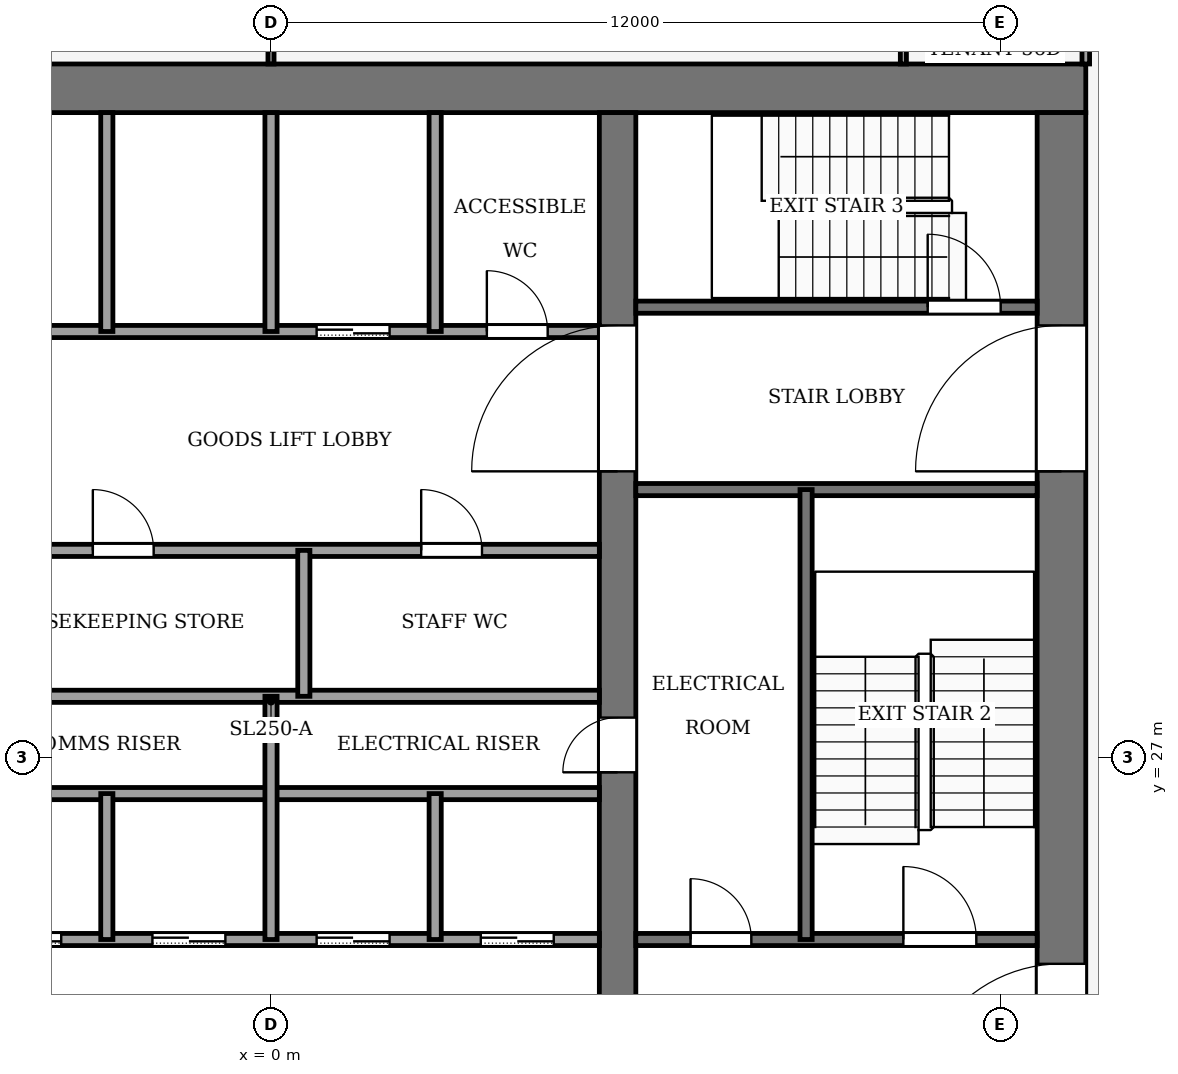
"""IFC4 building model, lengths in metres.
Left out: names, types, materials, properties, quantities, classifications, styles, units other than length and angle.
Written with IfcOpenShell. Run it as: python <this file> out.ifc"""

import sys

from ifc_helpers import new_model, si_unit, direction, frame, frame_2d, origin, place, context, subcontext, project, spatial, rectangle, extrude, element, fill, save


model = new_model("IFC4")
c1 = context("Model", 3, precision=1e-05, world=origin(), true_north=direction((0.0, 1.0)))
c2 = subcontext(c1, "Body", "Model", "MODEL_VIEW")
j1 = project(units=[si_unit("LENGTHUNIT", "METRE"), si_unit("PLANEANGLEUNIT", "RADIAN")], contexts=[c1])
p1 = place(None, origin())
s1 = spatial("IfcSite", under=j1, at=p1, CompositionType="ELEMENT")
p2 = place(p1, origin())
s2 = spatial("IfcBuilding", under=s1, at=p2, CompositionType="ELEMENT")
p3 = place(p2, frame((0.0, 0.0, 246.0)))
s3 = spatial("IfcBuildingStorey", under=s2, at=p3, CompositionType="ELEMENT", Elevation=246.0)
p4 = place(p3, frame((-13.4, 38.0, -0.13), z_axis=(0.0, 0.0, 1.0), x_axis=(1.0, 0.0, 0.0)))
e1 = element("IfcWall", 1, at=p4, inside=s3, PredefinedType="SHEAR", context=c2, shape_type="SweptSolid", body=[
    extrude(rectangle(XDim=26.8, YDim=0.8, at=frame_2d((13.4, 0.0))), origin(), (0.0, 0.0, 1.0), 4.0),
])
p5 = place(p3, frame((13.0, 18.4, -0.13), z_axis=(0.0, 0.0, 1.0), x_axis=(0.0, 1.0, 0.0)))
e2 = element("IfcWall", 2, at=p5, inside=s3, PredefinedType="SHEAR", context=c2, shape_type="SweptSolid", body=[
    extrude(rectangle(XDim=19.2, YDim=0.8, at=frame_2d((9.6, 0.0))), origin(), (0.0, 0.0, 1.0), 4.0),
])
p6 = place(p5, frame((2.8, 0.0, 0.13)))
e3 = element("IfcOpeningElement", 3, at=p6, cuts=e2, PredefinedType="OPENING", context=c2, shape_type="SweptSolid", body=[
    extrude(rectangle(XDim=2.4, YDim=2.4, at=frame_2d((1.2, 1.2))), frame((0.0, 0.41, 0.0), z_axis=(0.0, -1.0, 0.0), x_axis=(1.0, 0.0, 0.0)), (0.0, 0.0, 1.0), 0.82),
])
p7 = place(p5, frame((13.3, 0.0, 0.13)))
e4 = element("IfcOpeningElement", 4, at=p7, cuts=e2, PredefinedType="OPENING", context=c2, shape_type="SweptSolid", body=[
    extrude(rectangle(XDim=2.4, YDim=2.4, at=frame_2d((1.2, 1.2))), frame((0.0, 0.41, 0.0), z_axis=(0.0, -1.0, 0.0), x_axis=(1.0, 0.0, 0.0)), (0.0, 0.0, 1.0), 0.82),
])
p8 = place(p3, frame((5.7, 18.4, -0.13), z_axis=(0.0, 0.0, 1.0), x_axis=(0.0, 1.0, 0.0)))
e5 = element("IfcWall", 5, at=p8, inside=s3, PredefinedType="SHEAR", context=c2, shape_type="SweptSolid", body=[
    extrude(rectangle(XDim=19.2, YDim=0.6, at=frame_2d((9.6, 0.0))), origin(), (0.0, 0.0, 1.0), 4.0),
])
p9 = place(p8, frame((8.35, 0.0, 0.13)))
e6 = element("IfcOpeningElement", 6, at=p9, cuts=e5, PredefinedType="OPENING", context=c2, shape_type="SweptSolid", body=[
    extrude(rectangle(XDim=0.9, YDim=2.1, at=frame_2d((0.45, 1.05))), frame((0.0, 0.31, 0.0), z_axis=(0.0, -1.0, 0.0), x_axis=(1.0, 0.0, 0.0)), (0.0, 0.0, 1.0), 0.62),
])
p10 = place(p8, frame((13.3, 0.0, 0.13)))
e7 = element("IfcOpeningElement", 7, at=p10, cuts=e5, PredefinedType="OPENING", context=c2, shape_type="SweptSolid", body=[
    extrude(rectangle(XDim=2.4, YDim=2.4, at=frame_2d((1.2, 1.2))), frame((0.0, 0.31, 0.0), z_axis=(0.0, -1.0, 0.0), x_axis=(1.0, 0.0, 0.0)), (0.0, 0.0, 1.0), 0.62),
])
p11 = place(p3, frame((-5.4, 24.0, 0.0), z_axis=(0.0, 0.0, 1.0), x_axis=(1.0, 0.0, 0.0)))
e8 = element("IfcWall", 8, at=p11, inside=s3, PredefinedType="PARTITIONING", context=c2, shape_type="SweptSolid", body=[
    extrude(rectangle(XDim=10.8, YDim=0.2, at=frame_2d((5.4, 0.0))), origin(), (0.0, 0.0, 1.0), 3.87),
])
p12 = place(p11, frame((0.75, 0.0, 0.0)))
e9 = element("IfcOpeningElement", 9, at=p12, cuts=e8, PredefinedType="OPENING", context=c2, shape_type="SweptSolid", body=[
    extrude(rectangle(XDim=1.2, YDim=2.2, at=frame_2d((0.6, 1.1))), frame((0.0, 0.11, 0.0), z_axis=(0.0, -1.0, 0.0), x_axis=(1.0, 0.0, 0.0)), (0.0, 0.0, 1.0), 0.22),
])
p13 = place(p11, frame((3.45, 0.0, 0.0)))
e10 = element("IfcOpeningElement", 10, at=p13, cuts=e8, PredefinedType="OPENING", context=c2, shape_type="SweptSolid", body=[
    extrude(rectangle(XDim=1.2, YDim=2.2, at=frame_2d((0.6, 1.1))), frame((0.0, 0.11, 0.0), z_axis=(0.0, -1.0, 0.0), x_axis=(1.0, 0.0, 0.0)), (0.0, 0.0, 1.0), 0.22),
])
p14 = place(p11, frame((6.15, 0.0, 0.0)))
e11 = element("IfcOpeningElement", 11, at=p14, cuts=e8, PredefinedType="OPENING", context=c2, shape_type="SweptSolid", body=[
    extrude(rectangle(XDim=1.2, YDim=2.2, at=frame_2d((0.6, 1.1))), frame((0.0, 0.11, 0.0), z_axis=(0.0, -1.0, 0.0), x_axis=(1.0, 0.0, 0.0)), (0.0, 0.0, 1.0), 0.22),
])
p15 = place(p11, frame((8.85, 0.0, 0.0)))
e12 = element("IfcOpeningElement", 12, at=p15, cuts=e8, PredefinedType="OPENING", context=c2, shape_type="SweptSolid", body=[
    extrude(rectangle(XDim=1.2, YDim=2.2, at=frame_2d((0.6, 1.1))), frame((0.0, 0.11, 0.0), z_axis=(0.0, -1.0, 0.0), x_axis=(1.0, 0.0, 0.0)), (0.0, 0.0, 1.0), 0.22),
])
p16 = place(p3, frame((6.0, 24.0, 0.0), z_axis=(0.0, 0.0, 1.0), x_axis=(1.0, 0.0, 0.0)))
e13 = element("IfcWall", 13, at=p16, inside=s3, PredefinedType="PARTITIONING", context=c2, shape_type="SweptSolid", body=[
    extrude(rectangle(XDim=6.6, YDim=0.2, at=frame_2d((3.3, 0.0))), origin(), (0.0, 0.0, 1.0), 3.87),
])
p17 = place(p16, frame((0.9, 0.0, 0.0)))
e14 = element("IfcOpeningElement", 14, at=p17, cuts=e13, PredefinedType="OPENING", context=c2, shape_type="SweptSolid", body=[
    extrude(rectangle(XDim=1.0, YDim=2.1, at=frame_2d((0.5, 1.05))), frame((0.0, 0.11, 0.0), z_axis=(0.0, -1.0, 0.0), x_axis=(1.0, 0.0, 0.0)), (0.0, 0.0, 1.0), 0.22),
])
p18 = place(p16, frame((4.4, 0.0, 0.0)))
e15 = element("IfcOpeningElement", 15, at=p18, cuts=e13, PredefinedType="OPENING", context=c2, shape_type="SweptSolid", body=[
    extrude(rectangle(XDim=1.2, YDim=2.2, at=frame_2d((0.6, 1.1))), frame((0.0, 0.11, 0.0), z_axis=(0.0, -1.0, 0.0), x_axis=(1.0, 0.0, 0.0)), (0.0, 0.0, 1.0), 0.22),
])
for number, where, z_axis, x_axis in (
    (16, (-5.4, 26.4, 0.0), (0.0, 0.0, 1.0), (1.0, 0.0, 0.0)),
    (17, (-5.4, 28.0, 0.0), (0.0, 0.0, 1.0), (1.0, 0.0, 0.0)),
):
    element("IfcWall", number, at=place(p3, frame(where, z_axis=z_axis, x_axis=x_axis)), inside=s3, PredefinedType="PARTITIONING", context=c2, shape_type="SweptSolid", body=[
        extrude(rectangle(XDim=10.8, YDim=0.2, at=frame_2d((5.4, 0.0))), origin(), (0.0, 0.0, 1.0), 3.87),
    ])
p19 = place(p3, frame((-5.4, 30.4, 0.0), z_axis=(0.0, 0.0, 1.0), x_axis=(1.0, 0.0, 0.0)))
e18 = element("IfcWall", 18, at=p19, inside=s3, PredefinedType="PARTITIONING", context=c2, shape_type="SweptSolid", body=[
    extrude(rectangle(XDim=10.8, YDim=0.2, at=frame_2d((5.4, 0.0))), origin(), (0.0, 0.0, 1.0), 3.87),
])
p20 = place(p19, frame((2.47, 0.0, 0.0)))
e19 = element("IfcOpeningElement", 19, at=p20, cuts=e18, PredefinedType="OPENING", context=c2, shape_type="SweptSolid", body=[
    extrude(rectangle(XDim=1.0, YDim=2.1, at=frame_2d((0.5, 1.05))), frame((0.0, 0.11, 0.0), z_axis=(0.0, -1.0, 0.0), x_axis=(1.0, 0.0, 0.0)), (0.0, 0.0, 1.0), 0.22),
])
p21 = place(p19, frame((7.87, 0.0, 0.0)))
e20 = element("IfcOpeningElement", 20, at=p21, cuts=e18, PredefinedType="OPENING", context=c2, shape_type="SweptSolid", body=[
    extrude(rectangle(XDim=1.0, YDim=2.1, at=frame_2d((0.5, 1.05))), frame((0.0, 0.11, 0.0), z_axis=(0.0, -1.0, 0.0), x_axis=(1.0, 0.0, 0.0)), (0.0, 0.0, 1.0), 0.22),
])
p22 = place(p3, frame((6.0, 31.4, 0.0), z_axis=(0.0, 0.0, 1.0), x_axis=(1.0, 0.0, 0.0)))
e21 = element("IfcWall", 21, at=p22, inside=s3, PredefinedType="PARTITIONING", context=c2, shape_type="SweptSolid", body=[
    extrude(rectangle(XDim=6.6, YDim=0.2, at=frame_2d((3.3, 0.0))), origin(), (0.0, 0.0, 1.0), 3.87),
])
p23 = place(p3, frame((-5.4, 34.0, 0.0), z_axis=(0.0, 0.0, 1.0), x_axis=(1.0, 0.0, 0.0)))
e22 = element("IfcWall", 22, at=p23, inside=s3, PredefinedType="PARTITIONING", context=c2, shape_type="SweptSolid", body=[
    extrude(rectangle(XDim=10.8, YDim=0.2, at=frame_2d((5.4, 0.0))), origin(), (0.0, 0.0, 1.0), 3.87),
])
p24 = place(p23, frame((6.15, 0.0, 0.0)))
e23 = element("IfcOpeningElement", 23, at=p24, cuts=e22, PredefinedType="OPENING", context=c2, shape_type="SweptSolid", body=[
    extrude(rectangle(XDim=1.2, YDim=2.2, at=frame_2d((0.6, 1.1))), frame((0.0, 0.11, 0.0), z_axis=(0.0, -1.0, 0.0), x_axis=(1.0, 0.0, 0.0)), (0.0, 0.0, 1.0), 0.22),
])
p25 = place(p23, frame((8.95, 0.0, 0.0)))
e24 = element("IfcOpeningElement", 24, at=p25, cuts=e22, PredefinedType="OPENING", context=c2, shape_type="SweptSolid", body=[
    extrude(rectangle(XDim=1.0, YDim=2.1, at=frame_2d((0.5, 1.05))), frame((0.0, 0.11, 0.0), z_axis=(0.0, -1.0, 0.0), x_axis=(1.0, 0.0, 0.0)), (0.0, 0.0, 1.0), 0.22),
])
p26 = place(p3, frame((6.0, 34.4, 0.0), z_axis=(0.0, 0.0, 1.0), x_axis=(1.0, 0.0, 0.0)))
e25 = element("IfcWall", 25, at=p26, inside=s3, PredefinedType="PARTITIONING", context=c2, shape_type="SweptSolid", body=[
    extrude(rectangle(XDim=6.6, YDim=0.2, at=frame_2d((3.3, 0.0))), origin(), (0.0, 0.0, 1.0), 3.87),
])
p27 = place(p26, frame((4.8, 0.0, 0.0)))
e26 = element("IfcOpeningElement", 26, at=p27, cuts=e25, PredefinedType="OPENING", context=c2, shape_type="SweptSolid", body=[
    extrude(rectangle(XDim=1.2, YDim=2.2, at=frame_2d((0.6, 1.1))), frame((0.0, 0.11, 0.0), z_axis=(0.0, -1.0, 0.0), x_axis=(1.0, 0.0, 0.0)), (0.0, 0.0, 1.0), 0.22),
])
p28 = place(p3, frame((-2.7, 24.0, 0.0), z_axis=(0.0, 0.0, 1.0), x_axis=(0.0, 1.0, 0.0)))
e27 = element("IfcWall", 27, at=p28, inside=s3, PredefinedType="PARTITIONING", context=c2, shape_type="SweptSolid", body=[
    extrude(rectangle(XDim=2.4, YDim=0.2, at=frame_2d((1.2, 0.0))), origin(), (0.0, 0.0, 1.0), 3.87),
])
p29 = place(p3, frame((-2.7, 34.0, 0.0), z_axis=(0.0, 0.0, 1.0), x_axis=(0.0, 1.0, 0.0)))
e28 = element("IfcWall", 28, at=p29, inside=s3, PredefinedType="PARTITIONING", context=c2, shape_type="SweptSolid", body=[
    extrude(rectangle(XDim=3.6, YDim=0.2, at=frame_2d((1.8, 0.0))), origin(), (0.0, 0.0, 1.0), 3.87),
])
p30 = place(p3, frame((0.0, 24.0, 0.0), z_axis=(0.0, 0.0, 1.0), x_axis=(0.0, 1.0, 0.0)))
e29 = element("IfcWall", 29, at=p30, inside=s3, PredefinedType="PARTITIONING", context=c2, shape_type="SweptSolid", body=[
    extrude(rectangle(XDim=4.0, YDim=0.2, at=frame_2d((2.0, 0.0))), origin(), (0.0, 0.0, 1.0), 3.87),
])
p31 = place(p3, frame((0.0, 34.0, 0.0), z_axis=(0.0, 0.0, 1.0), x_axis=(0.0, 1.0, 0.0)))
e30 = element("IfcWall", 30, at=p31, inside=s3, PredefinedType="PARTITIONING", context=c2, shape_type="SweptSolid", body=[
    extrude(rectangle(XDim=3.6, YDim=0.2, at=frame_2d((1.8, 0.0))), origin(), (0.0, 0.0, 1.0), 3.87),
])
for number, where, z_axis, x_axis in (
    (31, (0.54, 28.0, 0.0), (0.0, 0.0, 1.0), (0.0, 1.0, 0.0)),
    (32, (2.7, 24.0, 0.0), (0.0, 0.0, 1.0), (0.0, 1.0, 0.0)),
):
    element("IfcWall", number, at=place(p3, frame(where, z_axis=z_axis, x_axis=x_axis)), inside=s3, PredefinedType="PARTITIONING", context=c2, shape_type="SweptSolid", body=[
        extrude(rectangle(XDim=2.4, YDim=0.2, at=frame_2d((1.2, 0.0))), origin(), (0.0, 0.0, 1.0), 3.87),
    ])
p32 = place(p3, frame((2.7, 34.0, 0.0), z_axis=(0.0, 0.0, 1.0), x_axis=(0.0, 1.0, 0.0)))
e33 = element("IfcWall", 33, at=p32, inside=s3, PredefinedType="PARTITIONING", context=c2, shape_type="SweptSolid", body=[
    extrude(rectangle(XDim=3.6, YDim=0.2, at=frame_2d((1.8, 0.0))), origin(), (0.0, 0.0, 1.0), 3.87),
])
p33 = place(p3, frame((8.8, 24.0, 0.0), z_axis=(0.0, 0.0, 1.0), x_axis=(0.0, 1.0, 0.0)))
e34 = element("IfcWall", 34, at=p33, inside=s3, PredefinedType="PARTITIONING", context=c2, shape_type="SweptSolid", body=[
    extrude(rectangle(XDim=7.4, YDim=0.2, at=frame_2d((3.7, 0.0))), origin(), (0.0, 0.0, 1.0), 3.87),
])
p34 = place(p3, frame((13.4, 38.4, 0.0), z_axis=(0.0, 0.0, 1.0), x_axis=(0.0, 1.0, 0.0)))
e35 = element("IfcWall", 35, at=p34, inside=s3, PredefinedType="PARTITIONING", context=c2, shape_type="SweptSolid", body=[
    extrude(rectangle(XDim=2.1, YDim=0.125, at=frame_2d((1.05, 0.0))), origin(), (0.0, 0.0, 1.0), 3.14),
])
p35 = place(p34, frame((0.55, 0.0, 0.0)))
e36 = element("IfcOpeningElement", 36, at=p35, cuts=e35, PredefinedType="OPENING", context=c2, shape_type="SweptSolid", body=[
    extrude(rectangle(XDim=1.0, YDim=2.1, at=frame_2d((0.5, 1.05))), frame((0.0, 0.073, 0.0), z_axis=(0.0, -1.0, 0.0), x_axis=(1.0, 0.0, 0.0)), (0.0, 0.0, 1.0), 0.145),
])
p36 = place(p3, frame((0.0, 38.4, 0.0), z_axis=(0.0, 0.0, 1.0), x_axis=(0.0, 1.0, 0.0)))
e37 = element("IfcWall", 37, at=p36, inside=s3, PredefinedType="PARTITIONING", context=c2, shape_type="SweptSolid", body=[
    extrude(rectangle(XDim=2.104, YDim=0.1, at=frame_2d((1.052, 0.0))), origin(), (0.0, 0.0, 1.0), 3.44),
])
p37 = place(p3, frame((10.4, 40.504, 0.0), z_axis=(0.0, 0.0, 1.0), x_axis=(0.0, -1.0, 0.0)))
e38 = element("IfcWall", 38, at=p37, inside=s3, PredefinedType="PARTITIONING", context=c2, shape_type="SweptSolid", body=[
    extrude(rectangle(XDim=2.104, YDim=0.1, at=frame_2d((1.052, 0.0))), origin(), (0.0, 0.0, 1.0), 3.87),
])
p38 = place(p12, origin())
e39 = element("IfcDoor", 39, at=p38, inside=s3, OperationType="SLIDING_TO_LEFT", PredefinedType="DOOR", context=c2, shape_type="SweptSolid", body=[
    extrude(rectangle(XDim=1.2, YDim=2.2, at=frame_2d((0.6, 1.1))), frame((0.0, 0.025, 0.0), z_axis=(0.0, -1.0, 0.0), x_axis=(1.0, 0.0, 0.0)), (0.0, 0.0, 1.0), 0.05),
])
fill(e9, e39)
p39 = place(p13, origin())
e40 = element("IfcDoor", 40, at=p39, inside=s3, OperationType="SLIDING_TO_LEFT", PredefinedType="DOOR", context=c2, shape_type="SweptSolid", body=[
    extrude(rectangle(XDim=1.2, YDim=2.2, at=frame_2d((0.6, 1.1))), frame((0.0, 0.025, 0.0), z_axis=(0.0, -1.0, 0.0), x_axis=(1.0, 0.0, 0.0)), (0.0, 0.0, 1.0), 0.05),
])
fill(e10, e40)
p40 = place(p14, origin())
e41 = element("IfcDoor", 41, at=p40, inside=s3, OperationType="SLIDING_TO_LEFT", PredefinedType="DOOR", context=c2, shape_type="SweptSolid", body=[
    extrude(rectangle(XDim=1.2, YDim=2.2, at=frame_2d((0.6, 1.1))), frame((0.0, 0.025, 0.0), z_axis=(0.0, -1.0, 0.0), x_axis=(1.0, 0.0, 0.0)), (0.0, 0.0, 1.0), 0.05),
])
fill(e11, e41)
p41 = place(p15, origin())
e42 = element("IfcDoor", 42, at=p41, inside=s3, OperationType="SLIDING_TO_LEFT", PredefinedType="DOOR", context=c2, shape_type="SweptSolid", body=[
    extrude(rectangle(XDim=1.2, YDim=2.2, at=frame_2d((0.6, 1.1))), frame((0.0, 0.025, 0.0), z_axis=(0.0, -1.0, 0.0), x_axis=(1.0, 0.0, 0.0)), (0.0, 0.0, 1.0), 0.05),
])
fill(e12, e42)
p42 = place(p24, origin())
e43 = element("IfcDoor", 43, at=p42, inside=s3, OperationType="SLIDING_TO_LEFT", PredefinedType="DOOR", context=c2, shape_type="SweptSolid", body=[
    extrude(rectangle(XDim=1.2, YDim=2.2, at=frame_2d((0.6, 1.1))), frame((0.0, 0.025, 0.0), z_axis=(0.0, -1.0, 0.0), x_axis=(1.0, 0.0, 0.0)), (0.0, 0.0, 1.0), 0.05),
])
fill(e23, e43)
p43 = place(p20, origin())
e44 = element("IfcDoor", 44, at=p43, inside=s3, OperationType="SINGLE_SWING_RIGHT", PredefinedType="DOOR", context=c2, shape_type="SweptSolid", body=[
    extrude(rectangle(XDim=1.0, YDim=2.1, at=frame_2d((0.5, 1.05))), frame((0.0, 0.025, 0.0), z_axis=(0.0, -1.0, 0.0), x_axis=(1.0, 0.0, 0.0)), (0.0, 0.0, 1.0), 0.05),
])
fill(e19, e44)
p44 = place(p21, origin())
e45 = element("IfcDoor", 45, at=p44, inside=s3, OperationType="SINGLE_SWING_LEFT", PredefinedType="DOOR", context=c2, shape_type="SweptSolid", body=[
    extrude(rectangle(XDim=1.0, YDim=2.1, at=frame_2d((0.5, 1.05))), frame((0.0, 0.025, 0.0), z_axis=(0.0, -1.0, 0.0), x_axis=(1.0, 0.0, 0.0)), (0.0, 0.0, 1.0), 0.05),
])
fill(e20, e45)
p45 = place(p17, origin())
e46 = element("IfcDoor", 46, at=p45, inside=s3, OperationType="SINGLE_SWING_RIGHT", PredefinedType="DOOR", context=c2, shape_type="SweptSolid", body=[
    extrude(rectangle(XDim=1.0, YDim=2.1, at=frame_2d((0.5, 1.05))), frame((0.0, 0.025, 0.0), z_axis=(0.0, -1.0, 0.0), x_axis=(1.0, 0.0, 0.0)), (0.0, 0.0, 1.0), 0.05),
])
fill(e14, e46)
p46 = place(p25, origin())
e47 = element("IfcDoor", 47, at=p46, inside=s3, OperationType="SINGLE_SWING_LEFT", PredefinedType="DOOR", context=c2, shape_type="SweptSolid", body=[
    extrude(rectangle(XDim=1.0, YDim=2.1, at=frame_2d((0.5, 1.05))), frame((0.0, 0.025, 0.0), z_axis=(0.0, -1.0, 0.0), x_axis=(1.0, 0.0, 0.0)), (0.0, 0.0, 1.0), 0.05),
])
fill(e24, e47)
p47 = place(p9, origin())
e48 = element("IfcDoor", 48, at=p47, inside=s3, OperationType="SINGLE_SWING_RIGHT", PredefinedType="DOOR", context=c2, shape_type="SweptSolid", body=[
    extrude(rectangle(XDim=0.9, YDim=2.1, at=frame_2d((0.45, 1.05))), frame((0.0, 0.025, 0.0), z_axis=(0.0, -1.0, 0.0), x_axis=(1.0, 0.0, 0.0)), (0.0, 0.0, 1.0), 0.05),
])
fill(e6, e48)
p48 = place(p18, origin())
e49 = element("IfcDoor", 49, at=p48, inside=s3, OperationType="SINGLE_SWING_LEFT", PredefinedType="DOOR", context=c2, shape_type="SweptSolid", body=[
    extrude(rectangle(XDim=1.2, YDim=2.2, at=frame_2d((0.6, 1.1))), frame((0.0, 0.025, 0.0), z_axis=(0.0, -1.0, 0.0), x_axis=(1.0, 0.0, 0.0)), (0.0, 0.0, 1.0), 0.05),
])
fill(e15, e49)
p49 = place(p27, origin())
e50 = element("IfcDoor", 50, at=p49, inside=s3, OperationType="SINGLE_SWING_RIGHT", PredefinedType="DOOR", context=c2, shape_type="SweptSolid", body=[
    extrude(rectangle(XDim=1.2, YDim=2.2, at=frame_2d((0.6, 1.1))), frame((0.0, 0.025, 0.0), z_axis=(0.0, -1.0, 0.0), x_axis=(1.0, 0.0, 0.0)), (0.0, 0.0, 1.0), 0.05),
])
fill(e26, e50)
p50 = place(p10, origin())
e51 = element("IfcDoor", 51, at=p50, inside=s3, OperationType="DOUBLE_DOOR_SINGLE_SWING", PredefinedType="DOOR", context=c2, shape_type="SweptSolid", body=[
    extrude(rectangle(XDim=2.4, YDim=2.4, at=frame_2d((1.2, 1.2))), frame((0.0, 0.025, 0.0), z_axis=(0.0, -1.0, 0.0), x_axis=(1.0, 0.0, 0.0)), (0.0, 0.0, 1.0), 0.05),
])
fill(e7, e51)
p51 = place(p6, origin())
e52 = element("IfcDoor", 52, at=p51, inside=s3, OperationType="DOUBLE_DOOR_SINGLE_SWING", PredefinedType="DOOR", context=c2, shape_type="SweptSolid", body=[
    extrude(rectangle(XDim=2.4, YDim=2.4, at=frame_2d((1.2, 1.2))), frame((0.0, 0.025, 0.0), z_axis=(0.0, -1.0, 0.0), x_axis=(1.0, 0.0, 0.0)), (0.0, 0.0, 1.0), 0.05),
])
fill(e3, e52)
p52 = place(p7, origin())
e53 = element("IfcDoor", 53, at=p52, inside=s3, OperationType="DOUBLE_DOOR_SINGLE_SWING", PredefinedType="DOOR", context=c2, shape_type="SweptSolid", body=[
    extrude(rectangle(XDim=2.4, YDim=2.4, at=frame_2d((1.2, 1.2))), frame((0.0, 0.025, 0.0), z_axis=(0.0, -1.0, 0.0), x_axis=(1.0, 0.0, 0.0)), (0.0, 0.0, 1.0), 0.05),
])
fill(e4, e53)
save(model, sys.argv[1])
